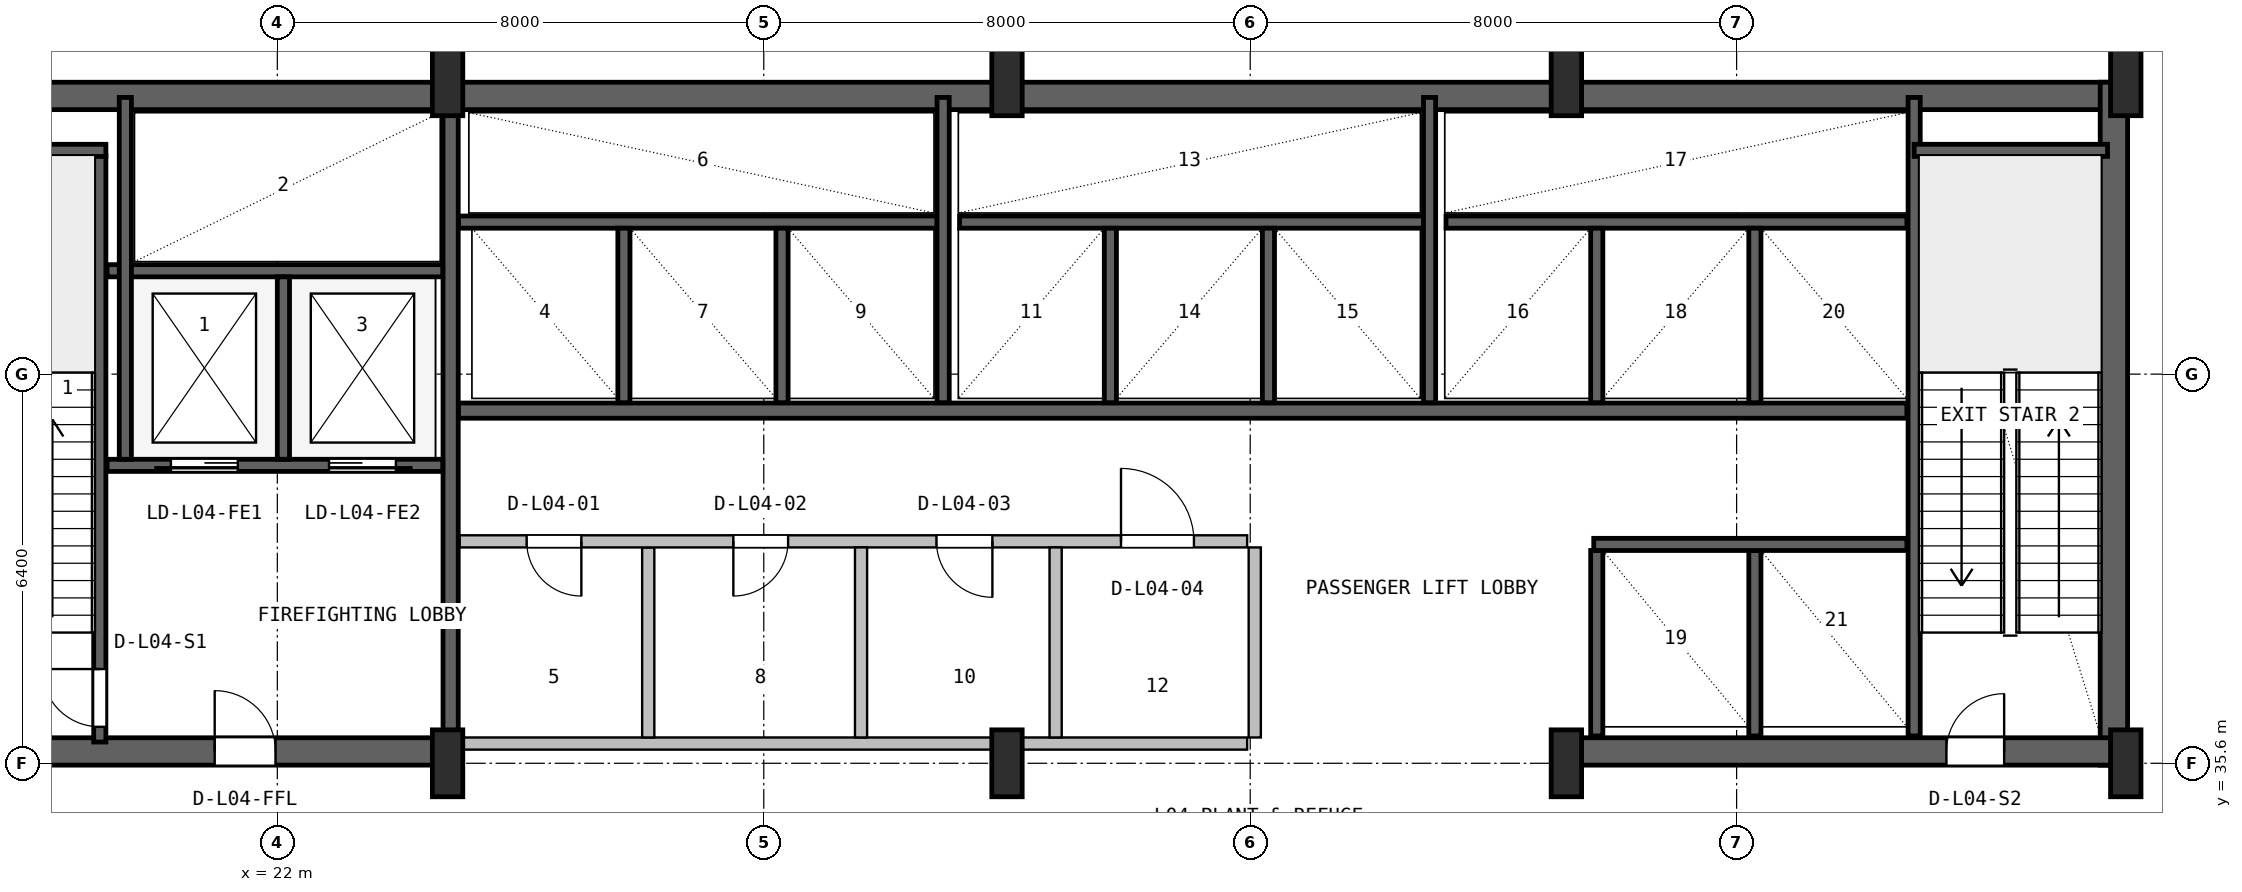
"""IFC4 building model, lengths in metres.
Left out: names, types, materials, properties, quantities, classifications, styles, units other than length and angle.
Written with IfcOpenShell. Run it as: python <this file> out.ifc"""

import sys

from ifc_helpers import new_model, si_unit, direction, frame, frame_2d, origin, origin_2d, place, context, subcontext, project, spatial, rectangle, i_section, extrude, source, transform, mapped, element, fill, save


model = new_model("IFC4")
c1 = context("Model", 3, precision=1e-05, world=origin(), true_north=direction((0.0, 1.0)))
c2 = subcontext(c1, "Body", "Model", "MODEL_VIEW")
j1 = project(units=[si_unit("LENGTHUNIT", "METRE"), si_unit("PLANEANGLEUNIT", "RADIAN")], contexts=[c1])
p1 = place(None, origin())
s1 = spatial("IfcSite", under=j1, at=p1, CompositionType="ELEMENT")
p2 = place(p1, origin())
s2 = spatial("IfcBuilding", under=s1, at=p2, CompositionType="ELEMENT")
p3 = place(p2, frame((0.0, 0.0, 22.2)))
s3 = spatial("IfcBuildingStorey", under=s2, at=p3, CompositionType="ELEMENT", Elevation=22.2)
p4 = place(p3, frame((15.6, 46.575, 0.0), z_axis=(0.0, 0.0, 1.0), x_axis=(1.0, 0.0, 0.0)))
e1 = element("IfcWall", 1, at=p4, inside=s3, PredefinedType="SHEAR", context=c2, shape_type="SweptSolid", body=[
    extrude(rectangle(XDim=36.8, YDim=0.45, at=frame_2d((18.4, 0.0))), origin(), (0.0, 0.0, 1.0), 5.08),
])
p5 = place(p3, frame((52.205, 35.57, 0.0), z_axis=(0.0, 0.0, 1.0), x_axis=(0.0, 1.0, 0.0)))
e2 = element("IfcWall", 2, at=p5, inside=s3, PredefinedType="SHEAR", context=c2, shape_type="SweptSolid", body=[
    extrude(rectangle(XDim=11.23, YDim=0.45, at=frame_2d((5.615, 0.0))), origin(), (0.0, 0.0, 1.0), 5.08),
])
p6 = place(p3, frame((15.57, 35.795, 0.0), z_axis=(0.0, 0.0, 1.0), x_axis=(1.0, 0.0, 0.0)))
e3 = element("IfcWall", 3, at=p6, inside=s3, PredefinedType="SHEAR", context=c2, shape_type="SweptSolid", body=[
    extrude(rectangle(XDim=9.23, YDim=0.45, at=frame_2d((4.615, 0.0))), origin(), (0.0, 0.0, 1.0), 5.08),
])
p7 = place(p6, frame((5.4, 0.0, 0.0)))
e4 = element("IfcOpeningElement", 4, at=p7, cuts=e3, PredefinedType="OPENING", context=c2, shape_type="SweptSolid", body=[
    extrude(rectangle(XDim=1.0, YDim=2.1, at=frame_2d((0.5, 1.05))), frame((0.0, 0.235, 0.0), z_axis=(0.0, -1.0, 0.0), x_axis=(1.0, 0.0, 0.0)), (0.0, 0.0, 1.0), 0.47),
])
p8 = place(p3, frame((43.2, 35.795, 0.0), z_axis=(0.0, 0.0, 1.0), x_axis=(1.0, 0.0, 0.0)))
e5 = element("IfcWall", 5, at=p8, inside=s3, PredefinedType="SHEAR", context=c2, shape_type="SweptSolid", body=[
    extrude(rectangle(XDim=9.23, YDim=0.45, at=frame_2d((4.615, 0.0))), origin(), (0.0, 0.0, 1.0), 5.08),
])
p9 = place(p8, frame((6.25, 0.0, 0.0)))
e6 = element("IfcOpeningElement", 6, at=p9, cuts=e5, PredefinedType="OPENING", context=c2, shape_type="SweptSolid", body=[
    extrude(rectangle(XDim=0.95, YDim=2.1, at=frame_2d((0.475, 1.05))), frame((0.0, 0.235, 0.0), z_axis=(0.0, -1.0, 0.0), x_axis=(1.0, 0.0, 0.0)), (0.0, 0.0, 1.0), 0.47),
])
m1 = source(origin(), c2, "Body", "SweptSolid", [
    extrude(i_section(OverallWidth=0.5, OverallDepth=1.1, WebThickness=0.018, FlangeThickness=0.032, FilletRadius=0.018, at=origin_2d()), origin(), (0.0, 0.0, 1.0), 5.4),
])
for number, where, z_axis, x_axis in (
    (7, (24.8, 35.6, 0.0), (0.0, 0.0, 1.0), (1.0, 0.0, 0.0)),
    (8, (24.8, 46.8, 0.0), (0.0, 0.0, 1.0), (1.0, 0.0, 0.0)),
    (9, (34.0, 35.6, 0.0), (0.0, 0.0, 1.0), (1.0, 0.0, 0.0)),
    (10, (34.0, 46.8, 0.0), (0.0, 0.0, 1.0), (1.0, 0.0, 0.0)),
    (11, (43.2, 35.6, 0.0), (0.0, 0.0, 1.0), (1.0, 0.0, 0.0)),
    (12, (43.2, 46.8, 0.0), (0.0, 0.0, 1.0), (1.0, 0.0, 0.0)),
    (13, (52.4, 35.6, 0.0), (0.0, 0.0, 1.0), (1.0, 0.0, 0.0)),
    (14, (52.4, 46.8, 0.0), (0.0, 0.0, 1.0), (1.0, 0.0, 0.0)),
):
    element("IfcColumn", number, at=place(p3, frame(where, z_axis=z_axis, x_axis=x_axis)), inside=s3, PredefinedType="COLUMN", context=c2, shape_type="MappedRepresentation", body=[
        mapped(m1, transform((0.0, 0.0, 0.0), x_axis=(1.0, 0.0, 0.0), y_axis=(0.0, 1.0, 0.0), z_axis=(0.0, 0.0, 1.0), scale=1.0)),
    ])
p10 = place(p3, frame((19.08, 35.95, 0.0), z_axis=(0.0, 0.0, 1.0), x_axis=(0.0, 1.0, 0.0)))
e15 = element("IfcWall", 15, at=p10, inside=s3, PredefinedType="SHEAR", context=c2, shape_type="SweptSolid", body=[
    extrude(rectangle(XDim=9.65, YDim=0.2, at=frame_2d((4.825, 0.0))), origin(), (0.0, 0.0, 1.0), 5.08),
])
p11 = place(p10, frame((0.25, 0.0, 0.0)))
e16 = element("IfcOpeningElement", 16, at=p11, cuts=e15, PredefinedType="OPENING", context=c2, shape_type="SweptSolid", body=[
    extrude(rectangle(XDim=0.95, YDim=2.1, at=frame_2d((0.475, 1.05))), frame((0.0, 0.11, 0.0), z_axis=(0.0, -1.0, 0.0), x_axis=(1.0, 0.0, 0.0)), (0.0, 0.0, 1.0), 0.22),
])
p12 = place(p3, frame((15.95, 45.68, 0.0), z_axis=(0.0, 0.0, 1.0), x_axis=(1.0, 0.0, 0.0)))
e17 = element("IfcWall", 17, at=p12, inside=s3, PredefinedType="SHEAR", context=c2, shape_type="SweptSolid", body=[
    extrude(rectangle(XDim=3.23, YDim=0.2, at=frame_2d((1.615, 0.0))), origin(), (0.0, 0.0, 1.0), 5.08),
])
p13 = place(p3, frame((24.85, 36.05, 0.0), z_axis=(0.0, 0.0, 1.0), x_axis=(0.0, 1.0, 0.0)))
e18 = element("IfcWall", 18, at=p13, inside=s3, PredefinedType="SHEAR", context=c2, shape_type="SweptSolid", body=[
    extrude(rectangle(XDim=10.45, YDim=0.25, at=frame_2d((5.225, 0.0))), origin(), (0.0, 0.0, 1.0), 5.08),
])
p14 = place(p3, frame((19.2, 40.5, 0.0), z_axis=(0.0, 0.0, 1.0), x_axis=(1.0, 0.0, 0.0)))
e19 = element("IfcWall", 19, at=p14, inside=s3, PredefinedType="SHEAR", context=c2, shape_type="SweptSolid", body=[
    extrude(rectangle(XDim=5.52, YDim=0.2, at=frame_2d((2.76, 0.0))), origin(), (0.0, 0.0, 1.0), 5.08),
])
p15 = place(p14, frame((1.05, 0.0, 0.0)))
e20 = element("IfcOpeningElement", 20, at=p15, cuts=e19, PredefinedType="OPENING", context=c2, shape_type="SweptSolid", body=[
    extrude(rectangle(XDim=1.1, YDim=2.18, at=frame_2d((0.55, 1.09))), frame((0.0, 0.11, 0.0), z_axis=(0.0, -1.0, 0.0), x_axis=(1.0, 0.0, 0.0)), (0.0, 0.0, 1.0), 0.22),
])
p16 = place(p14, frame((3.65, 0.0, 0.0)))
e21 = element("IfcOpeningElement", 21, at=p16, cuts=e19, PredefinedType="OPENING", context=c2, shape_type="SweptSolid", body=[
    extrude(rectangle(XDim=1.1, YDim=2.18, at=frame_2d((0.55, 1.09))), frame((0.0, 0.11, 0.0), z_axis=(0.0, -1.0, 0.0), x_axis=(1.0, 0.0, 0.0)), (0.0, 0.0, 1.0), 0.22),
])
p17 = place(p3, frame((19.2, 43.7, 0.0), z_axis=(0.0, 0.0, 1.0), x_axis=(1.0, 0.0, 0.0)))
e22 = element("IfcWall", 22, at=p17, inside=s3, PredefinedType="SHEAR", context=c2, shape_type="SweptSolid", body=[
    extrude(rectangle(XDim=5.52, YDim=0.2, at=frame_2d((2.76, 0.0))), origin(), (0.0, 0.0, 1.0), 5.08),
])
p18 = place(p3, frame((22.1, 40.6, 0.0), z_axis=(0.0, 0.0, 1.0), x_axis=(0.0, 1.0, 0.0)))
e23 = element("IfcWall", 23, at=p18, inside=s3, PredefinedType="SHEAR", context=c2, shape_type="SweptSolid", body=[
    extrude(rectangle(XDim=3.0, YDim=0.2, at=frame_2d((1.5, 0.0))), origin(), (0.0, 0.0, 1.0), 5.08),
])
p19 = place(p3, frame((19.5, 40.6, 0.0), z_axis=(0.0, 0.0, 1.0), x_axis=(0.0, 1.0, 0.0)))
e24 = element("IfcWall", 24, at=p19, inside=s3, PredefinedType="SHEAR", context=c2, shape_type="SweptSolid", body=[
    extrude(rectangle(XDim=5.95, YDim=0.2, at=frame_2d((2.975, 0.0))), origin(), (0.0, 0.0, 1.0), 5.08),
])
p20 = place(p3, frame((48.92, 36.05, 0.0), z_axis=(0.0, 0.0, 1.0), x_axis=(0.0, 1.0, 0.0)))
e25 = element("IfcWall", 25, at=p20, inside=s3, PredefinedType="SHEAR", context=c2, shape_type="SweptSolid", body=[
    extrude(rectangle(XDim=10.5, YDim=0.2, at=frame_2d((5.25, 0.0))), origin(), (0.0, 0.0, 1.0), 5.08),
])
p21 = place(p3, frame((48.92, 45.68, 0.0), z_axis=(0.0, 0.0, 1.0), x_axis=(1.0, 0.0, 0.0)))
e26 = element("IfcWall", 26, at=p21, inside=s3, PredefinedType="SHEAR", context=c2, shape_type="SweptSolid", body=[
    extrude(rectangle(XDim=3.18, YDim=0.2, at=frame_2d((1.59, 0.0))), origin(), (0.0, 0.0, 1.0), 5.08),
])
p22 = place(p3, frame((24.98, 41.4, 0.0), z_axis=(0.0, 0.0, 1.0), x_axis=(1.0, 0.0, 0.0)))
e27 = element("IfcWall", 27, at=p22, inside=s3, PredefinedType="SHEAR", context=c2, shape_type="SweptSolid", body=[
    extrude(rectangle(XDim=23.82, YDim=0.25, at=frame_2d((11.91, 0.0))), origin(), (0.0, 0.0, 1.0), 5.08),
])
p23 = place(p3, frame((24.98, 44.5, 0.0), z_axis=(0.0, 0.0, 1.0), x_axis=(1.0, 0.0, 0.0)))
e28 = element("IfcWall", 28, at=p23, inside=s3, PredefinedType="SHEAR", context=c2, shape_type="SweptSolid", body=[
    extrude(rectangle(XDim=7.87, YDim=0.2, at=frame_2d((3.935, 0.0))), origin(), (0.0, 0.0, 1.0), 5.08),
])
for number, where, z_axis, x_axis in (
    (29, (27.7, 41.53, 0.0), (0.0, 0.0, 1.0), (0.0, 1.0, 0.0)),
    (30, (30.3, 41.53, 0.0), (0.0, 0.0, 1.0), (0.0, 1.0, 0.0)),
):
    element("IfcWall", number, at=place(p3, frame(where, z_axis=z_axis, x_axis=x_axis)), inside=s3, PredefinedType="SHEAR", context=c2, shape_type="SweptSolid", body=[
        extrude(rectangle(XDim=2.87, YDim=0.2, at=frame_2d((1.435, 0.0))), origin(), (0.0, 0.0, 1.0), 5.08),
    ])
p24 = place(p3, frame((32.95, 41.53, 0.0), z_axis=(0.0, 0.0, 1.0), x_axis=(0.0, 1.0, 0.0)))
e31 = element("IfcWall", 31, at=p24, inside=s3, PredefinedType="SHEAR", context=c2, shape_type="SweptSolid", body=[
    extrude(rectangle(XDim=5.02, YDim=0.2, at=frame_2d((2.51, 0.0))), origin(), (0.0, 0.0, 1.0), 5.08),
])
p25 = place(p3, frame((33.22, 44.5, 0.0), z_axis=(0.0, 0.0, 1.0), x_axis=(1.0, 0.0, 0.0)))
e32 = element("IfcWall", 32, at=p25, inside=s3, PredefinedType="SHEAR", context=c2, shape_type="SweptSolid", body=[
    extrude(rectangle(XDim=7.63, YDim=0.2, at=frame_2d((3.815, 0.0))), origin(), (0.0, 0.0, 1.0), 5.08),
])
for number, where, z_axis, x_axis in (
    (33, (35.7, 41.53, 0.0), (0.0, 0.0, 1.0), (0.0, 1.0, 0.0)),
    (34, (38.3, 41.53, 0.0), (0.0, 0.0, 1.0), (0.0, 1.0, 0.0)),
):
    element("IfcWall", number, at=place(p3, frame(where, z_axis=z_axis, x_axis=x_axis)), inside=s3, PredefinedType="SHEAR", context=c2, shape_type="SweptSolid", body=[
        extrude(rectangle(XDim=2.87, YDim=0.2, at=frame_2d((1.435, 0.0))), origin(), (0.0, 0.0, 1.0), 5.08),
    ])
p26 = place(p3, frame((40.95, 41.53, 0.0), z_axis=(0.0, 0.0, 1.0), x_axis=(0.0, 1.0, 0.0)))
e35 = element("IfcWall", 35, at=p26, inside=s3, PredefinedType="SHEAR", context=c2, shape_type="SweptSolid", body=[
    extrude(rectangle(XDim=5.02, YDim=0.2, at=frame_2d((2.51, 0.0))), origin(), (0.0, 0.0, 1.0), 5.08),
])
p27 = place(p3, frame((41.22, 44.5, 0.0), z_axis=(0.0, 0.0, 1.0), x_axis=(1.0, 0.0, 0.0)))
e36 = element("IfcWall", 36, at=p27, inside=s3, PredefinedType="SHEAR", context=c2, shape_type="SweptSolid", body=[
    extrude(rectangle(XDim=7.58, YDim=0.2, at=frame_2d((3.79, 0.0))), origin(), (0.0, 0.0, 1.0), 5.08),
])
for number, where, z_axis, x_axis in (
    (37, (43.7, 41.53, 0.0), (0.0, 0.0, 1.0), (0.0, 1.0, 0.0)),
    (38, (46.3, 41.53, 0.0), (0.0, 0.0, 1.0), (0.0, 1.0, 0.0)),
):
    element("IfcWall", number, at=place(p3, frame(where, z_axis=z_axis, x_axis=x_axis)), inside=s3, PredefinedType="SHEAR", context=c2, shape_type="SweptSolid", body=[
        extrude(rectangle(XDim=2.87, YDim=0.2, at=frame_2d((1.435, 0.0))), origin(), (0.0, 0.0, 1.0), 5.08),
    ])
for number, where, z_axis, x_axis in (
    (39, (43.7, 36.05, 0.0), (0.0, 0.0, 1.0), (0.0, 1.0, 0.0)),
    (40, (46.3, 36.05, 0.0), (0.0, 0.0, 1.0), (0.0, 1.0, 0.0)),
):
    element("IfcWall", number, at=place(p3, frame(where, z_axis=z_axis, x_axis=x_axis)), inside=s3, PredefinedType="SHEAR", context=c2, shape_type="SweptSolid", body=[
        extrude(rectangle(XDim=3.05, YDim=0.2, at=frame_2d((1.525, 0.0))), origin(), (0.0, 0.0, 1.0), 5.08),
    ])
p28 = place(p3, frame((43.65, 39.2, 0.0), z_axis=(0.0, 0.0, 1.0), x_axis=(1.0, 0.0, 0.0)))
e41 = element("IfcWall", 41, at=p28, inside=s3, PredefinedType="SHEAR", context=c2, shape_type="SweptSolid", body=[
    extrude(rectangle(XDim=5.15, YDim=0.2, at=frame_2d((2.575, 0.0))), origin(), (0.0, 0.0, 1.0), 5.08),
])
p29 = place(p3, frame((25.0, 35.925, 0.0), z_axis=(0.0, 0.0, 1.0), x_axis=(1.0, 0.0, 0.0)))
e42 = element("IfcWall", 42, at=p29, inside=s3, PredefinedType="SOLIDWALL", context=c2, shape_type="SweptSolid", body=[
    extrude(rectangle(XDim=12.95, YDim=0.2, at=frame_2d((6.475, 0.0))), origin(), (0.0, 0.0, 1.0), 3.855),
])
p30 = place(p3, frame((28.1, 36.025, 0.0), z_axis=(0.0, 0.0, 1.0), x_axis=(0.0, 1.0, 0.0)))
e43 = element("IfcWall", 43, at=p30, inside=s3, PredefinedType="SOLIDWALL", context=c2, shape_type="SweptSolid", body=[
    extrude(rectangle(XDim=3.125, YDim=0.2, at=frame_2d((1.562, 0.0))), origin(), (0.0, 0.0, 1.0), 5.06),
])
p31 = place(p3, frame((25.0, 39.25, 0.0), z_axis=(0.0, 0.0, 1.0), x_axis=(1.0, 0.0, 0.0)))
e44 = element("IfcWall", 44, at=p31, inside=s3, PredefinedType="SOLIDWALL", context=c2, shape_type="SweptSolid", body=[
    extrude(rectangle(XDim=12.95, YDim=0.2, at=frame_2d((6.475, 0.0))), origin(), (0.0, 0.0, 1.0), 5.06),
])
p32 = place(p31, frame((1.1, 0.0, 0.0)))
e45 = element("IfcOpeningElement", 45, at=p32, cuts=e44, PredefinedType="OPENING", context=c2, shape_type="SweptSolid", body=[
    extrude(rectangle(XDim=0.9, YDim=2.06, at=frame_2d((0.45, 1.03))), frame((0.0, 0.11, 0.0), z_axis=(0.0, -1.0, 0.0), x_axis=(1.0, 0.0, 0.0)), (0.0, 0.0, 1.0), 0.22),
])
p33 = place(p31, frame((4.5, 0.0, 0.0)))
e46 = element("IfcOpeningElement", 46, at=p33, cuts=e44, PredefinedType="OPENING", context=c2, shape_type="SweptSolid", body=[
    extrude(rectangle(XDim=0.9, YDim=2.06, at=frame_2d((0.45, 1.03))), frame((0.0, 0.11, 0.0), z_axis=(0.0, -1.0, 0.0), x_axis=(1.0, 0.0, 0.0)), (0.0, 0.0, 1.0), 0.22),
])
p34 = place(p31, frame((7.84, 0.0, 0.0)))
e47 = element("IfcOpeningElement", 47, at=p34, cuts=e44, PredefinedType="OPENING", context=c2, shape_type="SweptSolid", body=[
    extrude(rectangle(XDim=0.92, YDim=2.08, at=frame_2d((0.46, 1.04))), frame((0.0, 0.11, 0.0), z_axis=(0.0, -1.0, 0.0), x_axis=(1.0, 0.0, 0.0)), (0.0, 0.0, 1.0), 0.22),
])
p35 = place(p31, frame((10.875, 0.0, 0.0)))
e48 = element("IfcOpeningElement", 48, at=p35, cuts=e44, PredefinedType="OPENING", context=c2, shape_type="SweptSolid", body=[
    extrude(rectangle(XDim=1.2, YDim=2.1, at=frame_2d((0.6, 1.05))), frame((0.0, 0.11, 0.0), z_axis=(0.0, -1.0, 0.0), x_axis=(1.0, 0.0, 0.0)), (0.0, 0.0, 1.0), 0.22),
])
for number, where, z_axis, x_axis in (
    (49, (31.6, 36.025, 0.0), (0.0, 0.0, 1.0), (0.0, 1.0, 0.0)),
    (50, (34.8, 36.025, 0.0), (0.0, 0.0, 1.0), (0.0, 1.0, 0.0)),
    (51, (38.075, 36.025, 0.0), (0.0, 0.0, 1.0), (0.0, 1.0, 0.0)),
):
    element("IfcWall", number, at=place(p3, frame(where, z_axis=z_axis, x_axis=x_axis)), inside=s3, PredefinedType="SOLIDWALL", context=c2, shape_type="SweptSolid", body=[
        extrude(rectangle(XDim=3.125, YDim=0.2, at=frame_2d((1.562, 0.0))), origin(), (0.0, 0.0, 1.0), 5.06),
    ])
m2 = source(origin(), c2, "Body", "SweptSolid", [
    extrude(rectangle(XDim=0.95, YDim=2.1, at=frame_2d((0.475, 1.05))), frame((0.0, 0.025, 0.0), z_axis=(0.0, -1.0, 0.0), x_axis=(1.0, 0.0, 0.0)), (0.0, 0.0, 1.0), 0.05),
])
p36 = place(p11, origin())
e52 = element("IfcDoor", 52, at=p36, inside=s3, OperationType="SINGLE_SWING_RIGHT", PredefinedType="DOOR", context=c2, shape_type="MappedRepresentation", body=[
    mapped(m2, transform((0.0, 0.0, 0.0), x_axis=(1.0, 0.0, 0.0), y_axis=(0.0, 1.0, 0.0), z_axis=(0.0, 0.0, 1.0), scale=1.0)),
])
fill(e16, e52)
m3 = source(origin(), c2, "Body", "SweptSolid", [
    extrude(rectangle(XDim=1.0, YDim=2.1, at=frame_2d((0.5, 1.05))), frame((0.0, 0.025, 0.0), z_axis=(0.0, -1.0, 0.0), x_axis=(1.0, 0.0, 0.0)), (0.0, 0.0, 1.0), 0.05),
])
p37 = place(p7, origin())
e53 = element("IfcDoor", 53, at=p37, inside=s3, OperationType="SINGLE_SWING_LEFT", PredefinedType="DOOR", context=c2, shape_type="MappedRepresentation", body=[
    mapped(m3, transform((0.0, 0.0, 0.0), x_axis=(1.0, 0.0, 0.0), y_axis=(0.0, 1.0, 0.0), z_axis=(0.0, 0.0, 1.0), scale=1.0)),
])
fill(e4, e53)
m4 = source(origin(), c2, "Body", "SweptSolid", [
    extrude(rectangle(XDim=1.1, YDim=2.18, at=frame_2d((0.55, 1.09))), frame((0.0, 0.025, 0.0), z_axis=(0.0, -1.0, 0.0), x_axis=(1.0, 0.0, 0.0)), (0.0, 0.0, 1.0), 0.05),
])
p38 = place(p15, frame((1.1, 0.0, 0.0), z_axis=(0.0, 0.0, 1.0), x_axis=(-1.0, 0.0, 0.0)))
e54 = element("IfcDoor", 54, at=p38, inside=s3, OperationType="SLIDING_TO_LEFT", PredefinedType="DOOR", context=c2, shape_type="MappedRepresentation", body=[
    mapped(m4, transform((0.0, 0.0, 0.0), x_axis=(1.0, 0.0, 0.0), y_axis=(0.0, 1.0, 0.0), z_axis=(0.0, 0.0, 1.0), scale=1.0)),
])
fill(e20, e54)
p39 = place(p16, frame((1.1, 0.0, 0.0), z_axis=(0.0, 0.0, 1.0), x_axis=(-1.0, 0.0, 0.0)))
e55 = element("IfcDoor", 55, at=p39, inside=s3, OperationType="SLIDING_TO_RIGHT", PredefinedType="DOOR", context=c2, shape_type="MappedRepresentation", body=[
    mapped(m4, transform((0.0, 0.0, 0.0), x_axis=(1.0, 0.0, 0.0), y_axis=(0.0, 1.0, 0.0), z_axis=(0.0, 0.0, 1.0), scale=1.0)),
])
fill(e21, e55)
p40 = place(p9, origin())
e56 = element("IfcDoor", 56, at=p40, inside=s3, OperationType="SINGLE_SWING_RIGHT", PredefinedType="DOOR", context=c2, shape_type="MappedRepresentation", body=[
    mapped(m2, transform((0.0, 0.0, 0.0), x_axis=(1.0, 0.0, 0.0), y_axis=(0.0, 1.0, 0.0), z_axis=(0.0, 0.0, 1.0), scale=1.0)),
])
fill(e6, e56)
m5 = source(origin(), c2, "Body", "SweptSolid", [
    extrude(rectangle(XDim=0.9, YDim=2.06, at=frame_2d((0.45, 1.03))), frame((0.0, 0.025, 0.0), z_axis=(0.0, -1.0, 0.0), x_axis=(1.0, 0.0, 0.0)), (0.0, 0.0, 1.0), 0.05),
])
p41 = place(p32, frame((0.9, 0.0, 0.0), z_axis=(0.0, 0.0, 1.0), x_axis=(-1.0, 0.0, 0.0)))
e57 = element("IfcDoor", 57, at=p41, inside=s3, OperationType="SINGLE_SWING_RIGHT", PredefinedType="DOOR", context=c2, shape_type="MappedRepresentation", body=[
    mapped(m5, transform((0.0, 0.0, 0.0), x_axis=(1.0, 0.0, 0.0), y_axis=(0.0, 1.0, 0.0), z_axis=(0.0, 0.0, 1.0), scale=1.0)),
])
fill(e45, e57)
p42 = place(p33, frame((0.9, 0.0, 0.0), z_axis=(0.0, 0.0, 1.0), x_axis=(-1.0, 0.0, 0.0)))
e58 = element("IfcDoor", 58, at=p42, inside=s3, OperationType="SINGLE_SWING_LEFT", PredefinedType="DOOR", context=c2, shape_type="MappedRepresentation", body=[
    mapped(m5, transform((0.0, 0.0, 0.0), x_axis=(1.0, 0.0, 0.0), y_axis=(0.0, 1.0, 0.0), z_axis=(0.0, 0.0, 1.0), scale=1.0)),
])
fill(e46, e58)
m6 = source(origin(), c2, "Body", "SweptSolid", [
    extrude(rectangle(XDim=0.92, YDim=2.08, at=frame_2d((0.46, 1.04))), frame((0.0, 0.025, 0.0), z_axis=(0.0, -1.0, 0.0), x_axis=(1.0, 0.0, 0.0)), (0.0, 0.0, 1.0), 0.05),
])
p43 = place(p34, frame((0.92, 0.0, 0.0), z_axis=(0.0, 0.0, 1.0), x_axis=(-1.0, 0.0, 0.0)))
e59 = element("IfcDoor", 59, at=p43, inside=s3, OperationType="SINGLE_SWING_RIGHT", PredefinedType="DOOR", context=c2, shape_type="MappedRepresentation", body=[
    mapped(m6, transform((0.0, 0.0, 0.0), x_axis=(1.0, 0.0, 0.0), y_axis=(0.0, 1.0, 0.0), z_axis=(0.0, 0.0, 1.0), scale=1.0)),
])
fill(e47, e59)
m7 = source(origin(), c2, "Body", "SweptSolid", [
    extrude(rectangle(XDim=1.2, YDim=2.1, at=frame_2d((0.6, 1.05))), frame((0.0, 0.025, 0.0), z_axis=(0.0, -1.0, 0.0), x_axis=(1.0, 0.0, 0.0)), (0.0, 0.0, 1.0), 0.05),
])
p44 = place(p35, origin())
e60 = element("IfcDoor", 60, at=p44, inside=s3, OperationType="SINGLE_SWING_LEFT", PredefinedType="DOOR", context=c2, shape_type="MappedRepresentation", body=[
    mapped(m7, transform((0.0, 0.0, 0.0), x_axis=(1.0, 0.0, 0.0), y_axis=(0.0, 1.0, 0.0), z_axis=(0.0, 0.0, 1.0), scale=1.0)),
])
fill(e48, e60)
save(model, sys.argv[1])
